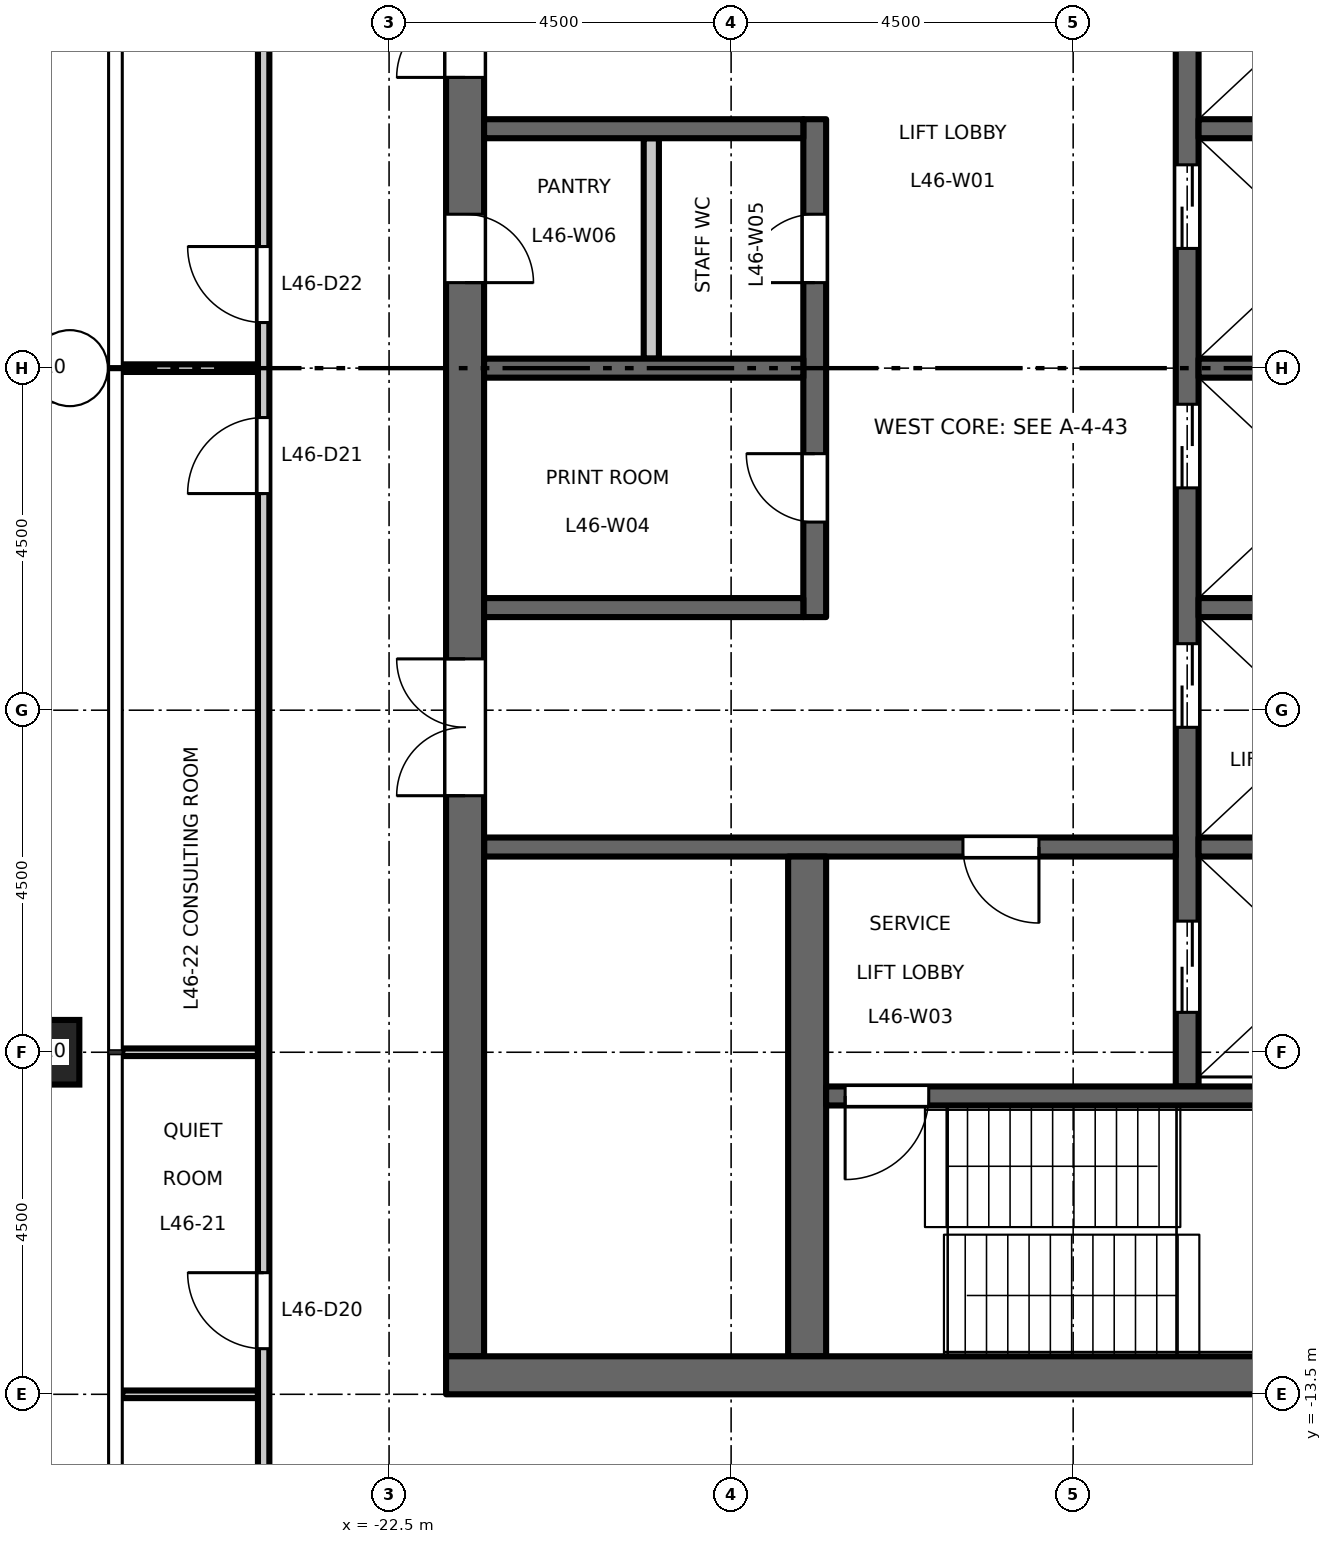
"""IFC4 building model, lengths in metres.
Left out: names, types, materials, properties, quantities, classifications, styles, units other than length and angle.
Written with IfcOpenShell. Run it as: python <this file> out.ifc"""

import sys

from ifc_helpers import new_model, si_unit, direction, frame, frame_2d, origin, origin_2d, place, context, subcontext, project, spatial, rectangle, hollow_rectangle, extrude, element, fill, save


model = new_model("IFC4")
c1 = context("Model", 3, precision=1e-05, world=origin(), true_north=direction((0.0, 1.0)))
c2 = subcontext(c1, "Body", "Model", "MODEL_VIEW")
j1 = project(units=[si_unit("LENGTHUNIT", "METRE"), si_unit("PLANEANGLEUNIT", "RADIAN")], contexts=[c1])
p1 = place(None, origin())
s1 = spatial("IfcSite", under=j1, at=p1, CompositionType="ELEMENT")
p2 = place(p1, origin())
s2 = spatial("IfcBuilding", under=s1, at=p2, CompositionType="ELEMENT")
p3 = place(p2, frame((0.0, 0.0, 215.2)))
s3 = spatial("IfcBuildingStorey", under=s2, at=p3, CompositionType="ELEMENT", Elevation=215.2)
for number, where, z_axis, x_axis in (
    (1, (-27.0, 0.0, 0.0), (0.0, 0.0, 1.0), (1.0, 0.0, 0.0)),
    (2, (-27.0, -9.0, 0.0), (0.0, 0.0, 1.0), (1.0, 0.0, 0.0)),
):
    element("IfcColumn", number, at=place(p3, frame(where, z_axis=z_axis, x_axis=x_axis)), inside=s3, PredefinedType="COLUMN", context=c2, shape_type="SweptSolid", body=[
        extrude(hollow_rectangle(XDim=0.85, YDim=0.85, WallThickness=0.05, at=origin_2d()), origin(), (0.0, 0.0, 1.0), 4.5),
    ])
p4 = place(p3, frame((-12.0, -9.45, 0.0), z_axis=(0.0, 0.0, 1.0), x_axis=(0.0, 1.0, 0.0)))
e3 = element("IfcWall", 3, at=p4, inside=s3, PredefinedType="SHEAR", context=c2, shape_type="SweptSolid", body=[
    extrude(rectangle(XDim=18.9, YDim=0.3, at=frame_2d((9.45, 0.0))), origin(), (0.0, 0.0, 1.0), 4.35),
])
p5 = place(p4, frame((4.725, 0.0, 0.0)))
e4 = element("IfcOpeningElement", 4, at=p5, cuts=e3, PredefinedType="OPENING", context=c2, shape_type="SweptSolid", body=[
    extrude(rectangle(XDim=1.1, YDim=2.1, at=frame_2d((0.55, 1.05))), frame((0.0, 0.16, 0.0), z_axis=(0.0, -1.0, 0.0), x_axis=(1.0, 0.0, 0.0)), (0.0, 0.0, 1.0), 0.32),
])
p6 = place(p4, frame((7.875, 0.0, 0.0)))
e5 = element("IfcOpeningElement", 5, at=p6, cuts=e3, PredefinedType="OPENING", context=c2, shape_type="SweptSolid", body=[
    extrude(rectangle(XDim=1.1, YDim=2.1, at=frame_2d((0.55, 1.05))), frame((0.0, 0.16, 0.0), z_axis=(0.0, -1.0, 0.0), x_axis=(1.0, 0.0, 0.0)), (0.0, 0.0, 1.0), 0.32),
])
p7 = place(p4, frame((11.025, 0.0, 0.0)))
e6 = element("IfcOpeningElement", 6, at=p7, cuts=e3, PredefinedType="OPENING", context=c2, shape_type="SweptSolid", body=[
    extrude(rectangle(XDim=1.1, YDim=2.1, at=frame_2d((0.55, 1.05))), frame((0.0, 0.16, 0.0), z_axis=(0.0, -1.0, 0.0), x_axis=(1.0, 0.0, 0.0)), (0.0, 0.0, 1.0), 0.32),
])
p8 = place(p4, frame((14.175, 0.0, 0.0)))
e7 = element("IfcOpeningElement", 7, at=p8, cuts=e3, PredefinedType="OPENING", context=c2, shape_type="SweptSolid", body=[
    extrude(rectangle(XDim=1.1, YDim=2.1, at=frame_2d((0.55, 1.05))), frame((0.0, 0.16, 0.0), z_axis=(0.0, -1.0, 0.0), x_axis=(1.0, 0.0, 0.0)), (0.0, 0.0, 1.0), 0.32),
])
p9 = place(p4, frame((16.725, 0.0, 0.0)))
e8 = element("IfcOpeningElement", 8, at=p9, cuts=e3, PredefinedType="OPENING", context=c2, shape_type="SweptSolid", body=[
    extrude(rectangle(XDim=1.2, YDim=2.1, at=frame_2d((0.6, 1.05))), frame((0.0, 0.16, 0.0), z_axis=(0.0, -1.0, 0.0), x_axis=(1.0, 0.0, 0.0)), (0.0, 0.0, 1.0), 0.32),
])
p10 = place(p4, frame((0.975, 0.0, 0.0)))
e9 = element("IfcOpeningElement", 9, at=p10, cuts=e3, PredefinedType="OPENING", context=c2, shape_type="SweptSolid", body=[
    extrude(rectangle(XDim=1.2, YDim=2.1, at=frame_2d((0.6, 1.05))), frame((0.0, 0.16, 0.0), z_axis=(0.0, -1.0, 0.0), x_axis=(1.0, 0.0, 0.0)), (0.0, 0.0, 1.0), 0.32),
])
p11 = place(p3, frame((-12.15, -6.3, 0.0), z_axis=(0.0, 0.0, 1.0), x_axis=(-1.0, 0.0, 0.0)))
e10 = element("IfcWall", 10, at=p11, inside=s3, PredefinedType="SHEAR", context=c2, shape_type="SweptSolid", body=[
    extrude(rectangle(XDim=9.1, YDim=0.25, at=frame_2d((4.55, 0.0))), origin(), (0.0, 0.0, 1.0), 4.35),
])
p12 = place(p11, frame((1.8, 0.0, 0.0)))
e11 = element("IfcOpeningElement", 11, at=p12, cuts=e10, PredefinedType="OPENING", context=c2, shape_type="SweptSolid", body=[
    extrude(rectangle(XDim=1.0, YDim=2.1, at=frame_2d((0.5, 1.05))), frame((0.0, 0.135, 0.0), z_axis=(0.0, -1.0, 0.0), x_axis=(1.0, 0.0, 0.0)), (0.0, 0.0, 1.0), 0.27),
])
p13 = place(p3, frame((-21.5, -13.0, 0.0), z_axis=(0.0, 0.0, 1.0), x_axis=(0.0, 1.0, 0.0)))
e12 = element("IfcWall", 12, at=p13, inside=s3, PredefinedType="SHEAR", context=c2, shape_type="SweptSolid", body=[
    extrude(rectangle(XDim=26.0, YDim=0.5, at=frame_2d((13.0, 0.0))), origin(), (0.0, 0.0, 1.0), 4.35),
])
p14 = place(p13, frame((16.825, 0.0, 0.0)))
e13 = element("IfcOpeningElement", 13, at=p14, cuts=e12, PredefinedType="OPENING", context=c2, shape_type="SweptSolid", body=[
    extrude(rectangle(XDim=1.8, YDim=2.1, at=frame_2d((0.9, 1.05))), frame((0.0, 0.26, 0.0), z_axis=(0.0, -1.0, 0.0), x_axis=(1.0, 0.0, 0.0)), (0.0, 0.0, 1.0), 0.52),
])
p15 = place(p13, frame((7.375, 0.0, 0.0)))
e14 = element("IfcOpeningElement", 14, at=p15, cuts=e12, PredefinedType="OPENING", context=c2, shape_type="SweptSolid", body=[
    extrude(rectangle(XDim=1.8, YDim=2.1, at=frame_2d((0.9, 1.05))), frame((0.0, 0.26, 0.0), z_axis=(0.0, -1.0, 0.0), x_axis=(1.0, 0.0, 0.0)), (0.0, 0.0, 1.0), 0.52),
])
p16 = place(p13, frame((14.125, 0.0, 0.0)))
e15 = element("IfcOpeningElement", 15, at=p16, cuts=e12, PredefinedType="OPENING", context=c2, shape_type="SweptSolid", body=[
    extrude(rectangle(XDim=0.9, YDim=2.1, at=frame_2d((0.45, 1.05))), frame((0.0, 0.26, 0.0), z_axis=(0.0, -1.0, 0.0), x_axis=(1.0, 0.0, 0.0)), (0.0, 0.0, 1.0), 0.52),
])
p17 = place(p3, frame((-16.9, -3.275, 0.0), z_axis=(0.0, 0.0, 1.0), x_axis=(0.0, 1.0, 0.0)))
e16 = element("IfcWall", 16, at=p17, inside=s3, PredefinedType="SHEAR", context=c2, shape_type="SweptSolid", body=[
    extrude(rectangle(XDim=6.55, YDim=0.3, at=frame_2d((3.275, 0.0))), origin(), (0.0, 0.0, 1.0), 4.35),
])
p18 = place(p17, frame((1.25, 0.0, 0.0)))
e17 = element("IfcOpeningElement", 17, at=p18, cuts=e16, PredefinedType="OPENING", context=c2, shape_type="SweptSolid", body=[
    extrude(rectangle(XDim=0.9, YDim=2.1, at=frame_2d((0.45, 1.05))), frame((0.0, 0.16, 0.0), z_axis=(0.0, -1.0, 0.0), x_axis=(1.0, 0.0, 0.0)), (0.0, 0.0, 1.0), 0.32),
])
p19 = place(p17, frame((4.4, 0.0, 0.0)))
e18 = element("IfcOpeningElement", 18, at=p19, cuts=e16, PredefinedType="OPENING", context=c2, shape_type="SweptSolid", body=[
    extrude(rectangle(XDim=0.9, YDim=2.1, at=frame_2d((0.45, 1.05))), frame((0.0, 0.16, 0.0), z_axis=(0.0, -1.0, 0.0), x_axis=(1.0, 0.0, 0.0)), (0.0, 0.0, 1.0), 0.32),
])
for number, where, z_axis, x_axis in (
    (19, (-17.05, 0.0, 0.0), (0.0, 0.0, 1.0), (-1.0, 0.0, 0.0)),
    (20, (-17.05, 3.15, 0.0), (0.0, 0.0, 1.0), (-1.0, 0.0, 0.0)),
    (21, (-17.05, -3.15, 0.0), (0.0, 0.0, 1.0), (-1.0, 0.0, 0.0)),
):
    element("IfcWall", number, at=place(p3, frame(where, z_axis=z_axis, x_axis=x_axis)), inside=s3, PredefinedType="SHEAR", context=c2, shape_type="SweptSolid", body=[
        extrude(rectangle(XDim=4.2, YDim=0.25, at=frame_2d((2.1, 0.0))), origin(), (0.0, 0.0, 1.0), 4.35),
    ])
p20 = place(p3, frame((-19.05, 0.125, 0.0), z_axis=(0.0, 0.0, 1.0), x_axis=(0.0, 1.0, 0.0)))
e22 = element("IfcWall", 22, at=p20, inside=s3, PredefinedType="PARTITIONING", context=c2, shape_type="SweptSolid", body=[
    extrude(rectangle(XDim=2.9, YDim=0.2, at=frame_2d((1.45, 0.0))), origin(), (0.0, 0.0, 1.0), 4.35),
])
p21 = place(p3, frame((-17.0, -13.0, 0.0), z_axis=(0.0, 0.0, 1.0), x_axis=(0.0, 1.0, 0.0)))
e23 = element("IfcWall", 23, at=p21, inside=s3, PredefinedType="SHEAR", context=c2, shape_type="SweptSolid", body=[
    extrude(rectangle(XDim=6.575, YDim=0.5, at=frame_2d((3.288, 0.0))), origin(), (0.0, 0.0, 1.0), 4.35),
])
for number, where, z_axis, x_axis in (
    (24, (-8.75, 0.0, 0.0), (0.0, 0.0, 1.0), (-1.0, 0.0, 0.0)),
    (25, (-8.75, 3.15, 0.0), (0.0, 0.0, 1.0), (-1.0, 0.0, 0.0)),
    (26, (-8.75, -3.15, 0.0), (0.0, 0.0, 1.0), (-1.0, 0.0, 0.0)),
    (27, (-8.75, -6.3, 0.0), (0.0, 0.0, 1.0), (-1.0, 0.0, 0.0)),
):
    element("IfcWall", number, at=place(p3, frame(where, z_axis=z_axis, x_axis=x_axis)), inside=s3, PredefinedType="SHEAR", context=c2, shape_type="SweptSolid", body=[
        extrude(rectangle(XDim=3.1, YDim=0.25, at=frame_2d((1.55, 0.0))), origin(), (0.0, 0.0, 1.0), 4.35),
    ])
p22 = place(p3, frame((-8.75, -9.575, 0.0), z_axis=(0.0, 0.0, 1.0), x_axis=(-1.0, 0.0, 0.0)))
e28 = element("IfcWall", 28, at=p22, inside=s3, PredefinedType="SHEAR", context=c2, shape_type="SweptSolid", body=[
    extrude(rectangle(XDim=8.0, YDim=0.25, at=frame_2d((4.0, 0.0))), origin(), (0.0, 0.0, 1.0), 4.35),
])
p23 = place(p22, frame((6.65, 0.0, 0.0)))
e29 = element("IfcOpeningElement", 29, at=p23, cuts=e28, PredefinedType="OPENING", context=c2, shape_type="SweptSolid", body=[
    extrude(rectangle(XDim=1.1, YDim=2.1, at=frame_2d((0.55, 1.05))), frame((0.0, 0.135, 0.0), z_axis=(0.0, -1.0, 0.0), x_axis=(1.0, 0.0, 0.0)), (0.0, 0.0, 1.0), 0.27),
])
p24 = place(p3, frame((-8.25, -13.25, 0.0), z_axis=(0.0, 0.0, 1.0), x_axis=(-1.0, 0.0, 0.0)))
e30 = element("IfcWall", 30, at=p24, inside=s3, PredefinedType="SHEAR", context=c2, shape_type="SweptSolid", body=[
    extrude(rectangle(XDim=13.5, YDim=0.5, at=frame_2d((6.75, 0.0))), origin(), (0.0, 0.0, 1.0), 4.35),
])
p25 = place(p3, frame((-26.01, -13.5, 0.0), z_axis=(0.0, 0.0, 1.0), x_axis=(1.0, 0.0, 0.0)))
e31 = element("IfcWall", 31, at=p25, inside=s3, PredefinedType="PARTITIONING", context=c2, shape_type="SweptSolid", body=[
    extrude(rectangle(XDim=1.785, YDim=0.1, at=frame_2d((0.893, 0.0))), origin(), (0.0, 0.0, 1.0), 3.95),
])
for number, where, z_axis, x_axis in (
    (32, (-26.01, -9.0, 0.0), (0.0, 0.0, 1.0), (1.0, 0.0, 0.0)),
    (33, (-26.01, 0.0, 0.0), (0.0, 0.0, 1.0), (1.0, 0.0, 0.0)),
):
    element("IfcWall", number, at=place(p3, frame(where, z_axis=z_axis, x_axis=x_axis)), inside=s3, PredefinedType="PARTITIONING", context=c2, shape_type="SweptSolid", body=[
        extrude(rectangle(XDim=1.785, YDim=0.1, at=frame_2d((0.893, 0.0))), origin(), (0.0, 0.0, 1.0), 4.35),
    ])
p26 = place(p3, frame((-24.15, -15.825, 0.0), z_axis=(0.0, 0.0, 1.0), x_axis=(0.0, 1.0, 0.0)))
e34 = element("IfcWall", 34, at=p26, inside=s3, PredefinedType="PARTITIONING", context=c2, shape_type="SweptSolid", body=[
    extrude(rectangle(XDim=31.65, YDim=0.15, at=frame_2d((15.825, 0.0))), origin(), (0.0, 0.0, 1.0), 4.35),
])
p27 = place(p26, frame((2.925, 0.0, 0.0)))
e35 = element("IfcOpeningElement", 35, at=p27, cuts=e34, PredefinedType="OPENING", context=c2, shape_type="SweptSolid", body=[
    extrude(rectangle(XDim=1.0, YDim=2.1, at=frame_2d((0.5, 1.05))), frame((0.0, 0.085, 0.0), z_axis=(0.0, -1.0, 0.0), x_axis=(1.0, 0.0, 0.0)), (0.0, 0.0, 1.0), 0.17),
])
p28 = place(p26, frame((14.175, 0.0, 0.0)))
e36 = element("IfcOpeningElement", 36, at=p28, cuts=e34, PredefinedType="OPENING", context=c2, shape_type="SweptSolid", body=[
    extrude(rectangle(XDim=1.0, YDim=2.1, at=frame_2d((0.5, 1.05))), frame((0.0, 0.085, 0.0), z_axis=(0.0, -1.0, 0.0), x_axis=(1.0, 0.0, 0.0)), (0.0, 0.0, 1.0), 0.17),
])
p29 = place(p26, frame((16.425, 0.0, 0.0)))
e37 = element("IfcOpeningElement", 37, at=p29, cuts=e34, PredefinedType="OPENING", context=c2, shape_type="SweptSolid", body=[
    extrude(rectangle(XDim=1.0, YDim=2.1, at=frame_2d((0.5, 1.05))), frame((0.0, 0.085, 0.0), z_axis=(0.0, -1.0, 0.0), x_axis=(1.0, 0.0, 0.0)), (0.0, 0.0, 1.0), 0.17),
])
p30 = place(p26, frame((27.675, 0.0, 0.0)))
e38 = element("IfcOpeningElement", 38, at=p30, cuts=e34, PredefinedType="OPENING", context=c2, shape_type="SweptSolid", body=[
    extrude(rectangle(XDim=1.0, YDim=2.1, at=frame_2d((0.5, 1.05))), frame((0.0, 0.085, 0.0), z_axis=(0.0, -1.0, 0.0), x_axis=(1.0, 0.0, 0.0)), (0.0, 0.0, 1.0), 0.17),
])
p31 = place(p12, origin())
e39 = element("IfcDoor", 39, at=p31, inside=s3, OperationType="SINGLE_SWING_RIGHT", PredefinedType="DOOR", context=c2, shape_type="SweptSolid", body=[
    extrude(rectangle(XDim=1.0, YDim=2.1, at=frame_2d((0.5, 1.05))), frame((0.0, 0.025, 0.0), z_axis=(0.0, -1.0, 0.0), x_axis=(1.0, 0.0, 0.0)), (0.0, 0.0, 1.0), 0.05),
])
fill(e11, e39)
p32 = place(p23, origin())
e40 = element("IfcDoor", 40, at=p32, inside=s3, OperationType="SINGLE_SWING_LEFT", PredefinedType="DOOR", context=c2, shape_type="SweptSolid", body=[
    extrude(rectangle(XDim=1.1, YDim=2.1, at=frame_2d((0.55, 1.05))), frame((0.0, 0.025, 0.0), z_axis=(0.0, -1.0, 0.0), x_axis=(1.0, 0.0, 0.0)), (0.0, 0.0, 1.0), 0.05),
])
fill(e29, e40)
p33 = place(p14, origin())
e41 = element("IfcDoor", 41, at=p33, inside=s3, OperationType="DOUBLE_DOOR_DOUBLE_SWING", PredefinedType="DOOR", context=c2, shape_type="SweptSolid", body=[
    extrude(rectangle(XDim=1.8, YDim=2.1, at=frame_2d((0.9, 1.05))), frame((0.0, 0.025, 0.0), z_axis=(0.0, -1.0, 0.0), x_axis=(1.0, 0.0, 0.0)), (0.0, 0.0, 1.0), 0.05),
])
fill(e13, e41)
p34 = place(p15, origin())
e42 = element("IfcDoor", 42, at=p34, inside=s3, OperationType="DOUBLE_DOOR_DOUBLE_SWING", PredefinedType="DOOR", context=c2, shape_type="SweptSolid", body=[
    extrude(rectangle(XDim=1.8, YDim=2.1, at=frame_2d((0.9, 1.05))), frame((0.0, 0.025, 0.0), z_axis=(0.0, -1.0, 0.0), x_axis=(1.0, 0.0, 0.0)), (0.0, 0.0, 1.0), 0.05),
])
fill(e14, e42)
p35 = place(p5, origin())
e43 = element("IfcDoor", 43, at=p35, inside=s3, OperationType="DOUBLE_DOOR_SLIDING", PredefinedType="DOOR", context=c2, shape_type="SweptSolid", body=[
    extrude(rectangle(XDim=1.1, YDim=2.1, at=frame_2d((0.55, 1.05))), frame((0.0, 0.025, 0.0), z_axis=(0.0, -1.0, 0.0), x_axis=(1.0, 0.0, 0.0)), (0.0, 0.0, 1.0), 0.05),
])
fill(e4, e43)
p36 = place(p6, origin())
e44 = element("IfcDoor", 44, at=p36, inside=s3, OperationType="DOUBLE_DOOR_SLIDING", PredefinedType="DOOR", context=c2, shape_type="SweptSolid", body=[
    extrude(rectangle(XDim=1.1, YDim=2.1, at=frame_2d((0.55, 1.05))), frame((0.0, 0.025, 0.0), z_axis=(0.0, -1.0, 0.0), x_axis=(1.0, 0.0, 0.0)), (0.0, 0.0, 1.0), 0.05),
])
fill(e5, e44)
p37 = place(p7, origin())
e45 = element("IfcDoor", 45, at=p37, inside=s3, OperationType="DOUBLE_DOOR_SLIDING", PredefinedType="DOOR", context=c2, shape_type="SweptSolid", body=[
    extrude(rectangle(XDim=1.1, YDim=2.1, at=frame_2d((0.55, 1.05))), frame((0.0, 0.025, 0.0), z_axis=(0.0, -1.0, 0.0), x_axis=(1.0, 0.0, 0.0)), (0.0, 0.0, 1.0), 0.05),
])
fill(e6, e45)
p38 = place(p10, origin())
e46 = element("IfcDoor", 46, at=p38, inside=s3, OperationType="DOUBLE_DOOR_SLIDING", PredefinedType="DOOR", context=c2, shape_type="SweptSolid", body=[
    extrude(rectangle(XDim=1.2, YDim=2.1, at=frame_2d((0.6, 1.05))), frame((0.0, 0.025, 0.0), z_axis=(0.0, -1.0, 0.0), x_axis=(1.0, 0.0, 0.0)), (0.0, 0.0, 1.0), 0.05),
])
fill(e9, e46)
p39 = place(p18, origin())
e47 = element("IfcDoor", 47, at=p39, inside=s3, OperationType="SINGLE_SWING_LEFT", PredefinedType="DOOR", context=c2, shape_type="SweptSolid", body=[
    extrude(rectangle(XDim=0.9, YDim=2.1, at=frame_2d((0.45, 1.05))), frame((0.0, 0.025, 0.0), z_axis=(0.0, -1.0, 0.0), x_axis=(1.0, 0.0, 0.0)), (0.0, 0.0, 1.0), 0.05),
])
fill(e17, e47)
p40 = place(p19, origin())
e48 = element("IfcDoor", 48, at=p40, inside=s3, OperationType="SINGLE_SWING_RIGHT", PredefinedType="DOOR", context=c2, shape_type="SweptSolid", body=[
    extrude(rectangle(XDim=0.9, YDim=2.1, at=frame_2d((0.45, 1.05))), frame((0.0, 0.025, 0.0), z_axis=(0.0, -1.0, 0.0), x_axis=(1.0, 0.0, 0.0)), (0.0, 0.0, 1.0), 0.05),
])
fill(e18, e48)
p41 = place(p16, origin())
e49 = element("IfcDoor", 49, at=p41, inside=s3, OperationType="SINGLE_SWING_LEFT", PredefinedType="DOOR", context=c2, shape_type="SweptSolid", body=[
    extrude(rectangle(XDim=0.9, YDim=2.1, at=frame_2d((0.45, 1.05))), frame((0.0, 0.025, 0.0), z_axis=(0.0, -1.0, 0.0), x_axis=(1.0, 0.0, 0.0)), (0.0, 0.0, 1.0), 0.05),
])
fill(e15, e49)
p42 = place(p27, origin())
e50 = element("IfcDoor", 50, at=p42, inside=s3, OperationType="SINGLE_SWING_RIGHT", PredefinedType="DOOR", context=c2, shape_type="SweptSolid", body=[
    extrude(rectangle(XDim=1.0, YDim=2.1, at=frame_2d((0.5, 1.05))), frame((0.0, 0.025, 0.0), z_axis=(0.0, -1.0, 0.0), x_axis=(1.0, 0.0, 0.0)), (0.0, 0.0, 1.0), 0.05),
])
fill(e35, e50)
p43 = place(p28, origin())
e51 = element("IfcDoor", 51, at=p43, inside=s3, OperationType="SINGLE_SWING_LEFT", PredefinedType="DOOR", context=c2, shape_type="SweptSolid", body=[
    extrude(rectangle(XDim=1.0, YDim=2.1, at=frame_2d((0.5, 1.05))), frame((0.0, 0.025, 0.0), z_axis=(0.0, -1.0, 0.0), x_axis=(1.0, 0.0, 0.0)), (0.0, 0.0, 1.0), 0.05),
])
fill(e36, e51)
p44 = place(p29, origin())
e52 = element("IfcDoor", 52, at=p44, inside=s3, OperationType="SINGLE_SWING_RIGHT", PredefinedType="DOOR", context=c2, shape_type="SweptSolid", body=[
    extrude(rectangle(XDim=1.0, YDim=2.1, at=frame_2d((0.5, 1.05))), frame((0.0, 0.025, 0.0), z_axis=(0.0, -1.0, 0.0), x_axis=(1.0, 0.0, 0.0)), (0.0, 0.0, 1.0), 0.05),
])
fill(e37, e52)
save(model, sys.argv[1])
